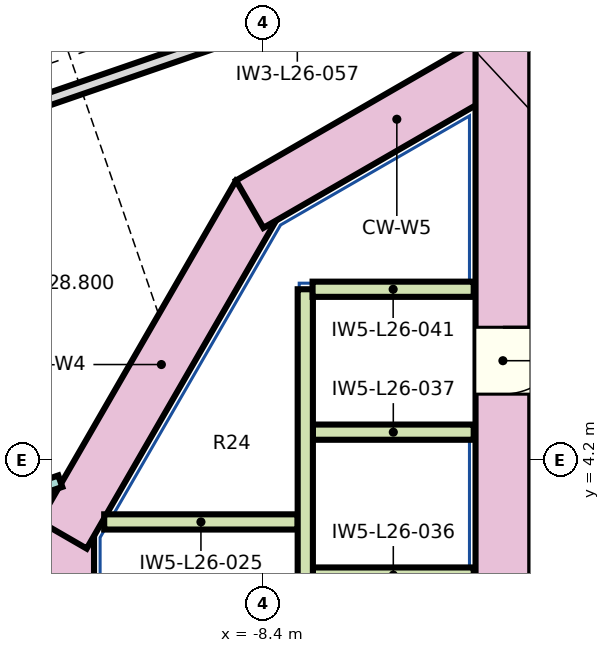
"""IFC4 building model, lengths in metres.
Left out: names, types, materials, properties, quantities, classifications, styles, units other than length and angle.
Written with IfcOpenShell. Run it as: python <this file> out.ifc"""

import sys

from ifc_helpers import new_model, si_unit, direction, frame, frame_2d, origin, place, context, subcontext, project, spatial, rectangle, extrude, element, fill, save


model = new_model("IFC4")
c1 = context("Model", 3, precision=1e-05, world=origin(), true_north=direction((0.0, 1.0)))
c2 = subcontext(c1, "Body", "Model", "MODEL_VIEW")
j1 = project(units=[si_unit("LENGTHUNIT", "METRE"), si_unit("PLANEANGLEUNIT", "RADIAN")], contexts=[c1])
p1 = place(None, origin())
s1 = spatial("IfcSite", under=j1, at=p1, CompositionType="ELEMENT")
p2 = place(p1, origin())
s2 = spatial("IfcBuilding", under=s1, at=p2, CompositionType="ELEMENT")
p3 = place(p2, frame((0.0, 0.0, 126.9)))
s3 = spatial("IfcBuildingStorey", under=s2, at=p3, CompositionType="ELEMENT", Elevation=126.9)
p4 = place(p3, frame((-11.624, -3.235, 0.0), z_axis=(0.0, 0.0, 1.0), x_axis=(0.0, 1.0, 0.0)))
e1 = element("IfcWall", 1, at=p4, inside=s3, PredefinedType="SHEAR", context=c2, shape_type="SweptSolid", body=[
    extrude(rectangle(XDim=6.471, YDim=0.9, at=frame_2d((3.235, 0.0))), origin(), (0.0, 0.0, 1.0), 3.8),
])
p5 = place(p3, frame((-11.684, 3.01, 0.0), z_axis=(0.0, 0.0, 1.0), x_axis=(0.499990282633, 0.866031014036, 0.0)))
e2 = element("IfcWall", 2, at=p5, inside=s3, PredefinedType="SHEAR", context=c2, shape_type="SweptSolid", body=[
    extrude(rectangle(XDim=6.47, YDim=0.9, at=frame_2d((3.235, 0.0))), origin(), (0.0, 0.0, 1.0), 3.8),
])
p6 = place(p3, frame((-8.614, 8.449, 0.0), z_axis=(0.0, 0.0, 1.0), x_axis=(0.866026961591, 0.49999730179, 0.0)))
e3 = element("IfcWall", 3, at=p6, inside=s3, PredefinedType="SHEAR", context=c2, shape_type="SweptSolid", body=[
    extrude(rectangle(XDim=5.587, YDim=0.9, at=frame_2d((2.794, 0.0))), origin(), (0.0, 0.0, 1.0), 3.8),
])
p7 = place(p3, frame((-4.45, 11.633, 0.0), z_axis=(0.0, 0.0, 1.0), x_axis=(0.0, -1.0, 0.0)))
e4 = element("IfcWall", 4, at=p7, inside=s3, PredefinedType="SHEAR", context=c2, shape_type="SweptSolid", body=[
    extrude(rectangle(XDim=23.265, YDim=0.9, at=frame_2d((11.633, 0.0))), origin(), (0.0, 0.0, 1.0), 3.8),
])
p8 = place(p7, frame((14.607, 0.0, 0.0)))
e5 = element("IfcOpeningElement", 5, at=p8, cuts=e4, PredefinedType="OPENING", context=c2, shape_type="SweptSolid", body=[
    extrude(rectangle(XDim=1.1, YDim=2.1, at=frame_2d((0.55, 1.05))), frame((0.0, 0.46, 0.0), z_axis=(0.0, -1.0, 0.0), x_axis=(1.0, 0.0, 0.0)), (0.0, 0.0, 1.0), 0.92),
])
p9 = place(p7, frame((16.958, 0.0, 0.0)))
e6 = element("IfcOpeningElement", 6, at=p9, cuts=e4, PredefinedType="OPENING", context=c2, shape_type="SweptSolid", body=[
    extrude(rectangle(XDim=1.1, YDim=2.1, at=frame_2d((0.55, 1.05))), frame((0.0, 0.46, 0.0), z_axis=(0.0, -1.0, 0.0), x_axis=(1.0, 0.0, 0.0)), (0.0, 0.0, 1.0), 0.92),
])
p10 = place(p7, frame((5.208, 0.0, 0.0)))
e7 = element("IfcOpeningElement", 7, at=p10, cuts=e4, PredefinedType="OPENING", context=c2, shape_type="SweptSolid", body=[
    extrude(rectangle(XDim=1.1, YDim=2.1, at=frame_2d((0.55, 1.05))), frame((0.0, 0.46, 0.0), z_axis=(0.0, -1.0, 0.0), x_axis=(1.0, 0.0, 0.0)), (0.0, 0.0, 1.0), 0.92),
])
p11 = place(p3, frame((-11.729, 3.894, 0.0), z_axis=(0.0, 0.0, 1.0), x_axis=(-0.945518607186, -0.325568062721, 0.0)))
e8 = element("IfcWall", 8, at=p11, inside=s3, PredefinedType="PARTITIONING", context=c2, shape_type="SweptSolid", body=[
    extrude(rectangle(XDim=3.116, YDim=0.2, at=frame_2d((1.558, 0.0))), origin(), (0.0, 0.0, 1.0), 3.55),
])
p12 = place(p3, frame((-11.007, 3.224, 0.0), z_axis=(0.0, 0.0, 1.0), x_axis=(1.0, 0.0, 0.0)))
e9 = element("IfcWall", 9, at=p12, inside=s3, PredefinedType="SOLIDWALL", context=c2, shape_type="SweptSolid", body=[
    extrude(rectangle(XDim=3.182, YDim=0.25, at=frame_2d((1.591, 0.0))), origin(), (0.0, 0.0, 1.0), 3.55),
])
for number, where, z_axis, x_axis in (
    (10, (-7.575, 2.35, 0.0), (0.0, 0.0, 1.0), (1.0, 0.0, 0.0)),
    (11, (-7.575, 4.7, 0.0), (0.0, 0.0, 1.0), (1.0, 0.0, 0.0)),
):
    element("IfcWall", number, at=place(p3, frame(where, z_axis=z_axis, x_axis=x_axis)), inside=s3, PredefinedType="SOLIDWALL", context=c2, shape_type="SweptSolid", body=[
        extrude(rectangle(XDim=2.645, YDim=0.25, at=frame_2d((1.323, 0.0))), origin(), (0.0, 0.0, 1.0), 3.55),
    ])
p13 = place(p3, frame((-7.7, 7.05, 0.0), z_axis=(0.0, 0.0, 1.0), x_axis=(0.0, -1.0, 0.0)))
e12 = element("IfcWall", 12, at=p13, inside=s3, PredefinedType="SOLIDWALL", context=c2, shape_type="SweptSolid", body=[
    extrude(rectangle(XDim=13.98, YDim=0.25, at=frame_2d((6.99, 0.0))), origin(), (0.0, 0.0, 1.0), 3.55),
])
p14 = place(p3, frame((-4.93, 7.05, 0.0), z_axis=(0.0, 0.0, 1.0), x_axis=(-1.0, 0.0, 0.0)))
e13 = element("IfcWall", 13, at=p14, inside=s3, PredefinedType="SOLIDWALL", context=c2, shape_type="SweptSolid", body=[
    extrude(rectangle(XDim=2.65, YDim=0.25, at=frame_2d((1.325, 0.0))), origin(), (0.0, 0.0, 1.0), 3.55),
])
p15 = place(p3, frame((4.599, 15.862, 0.0), z_axis=(0.0, 0.0, 1.0), x_axis=(-0.94551912499, -0.325566558907, 0.0)))
e14 = element("IfcWall", 14, at=p15, inside=s3, PredefinedType="PARTITIONING", context=c2, shape_type="SweptSolid", body=[
    extrude(rectangle(XDim=26.293, YDim=0.2, at=frame_2d((13.146, 0.0))), origin(), (0.0, 0.0, 1.0), 3.55),
])
p16 = place(p15, frame((10.81, 0.0, 0.0)))
e15 = element("IfcOpeningElement", 15, at=p16, cuts=e14, PredefinedType="OPENING", context=c2, shape_type="SweptSolid", body=[
    extrude(rectangle(XDim=0.9, YDim=2.1, at=frame_2d((0.45, 1.05))), frame((0.0, 0.11, 0.0), z_axis=(0.0, -1.0, 0.0), x_axis=(1.0, 0.0, 0.0)), (0.0, 0.0, 1.0), 0.22),
])
p17 = place(p15, frame((3.865, 0.0, 0.0)))
e16 = element("IfcOpeningElement", 16, at=p17, cuts=e14, PredefinedType="OPENING", context=c2, shape_type="SweptSolid", body=[
    extrude(rectangle(XDim=2.0, YDim=2.1, at=frame_2d((1.0, 1.05))), frame((0.0, 0.11, 0.0), z_axis=(0.0, -1.0, 0.0), x_axis=(1.0, 0.0, 0.0)), (0.0, 0.0, 1.0), 0.22),
])
p18 = place(p3, frame((12.7, 20.555, 0.0), z_axis=(0.0, 0.0, 1.0), x_axis=(-0.945517119144, -0.32557238428, 0.0)))
e17 = element("IfcWall", 17, at=p18, inside=s3, PredefinedType="PARTITIONING", context=c2, shape_type="SweptSolid", body=[
    extrude(rectangle(XDim=37.38, YDim=0.2, at=frame_2d((18.69, 0.0))), origin(), (0.0, 0.0, 1.0), 3.55),
])
p19 = place(p18, frame((7.0, 0.0, 0.0)))
e18 = element("IfcOpeningElement", 18, at=p19, cuts=e17, PredefinedType="OPENING", context=c2, shape_type="SweptSolid", body=[
    extrude(rectangle(XDim=1.2, YDim=2.1, at=frame_2d((0.6, 1.05))), frame((0.0, 0.11, 0.0), z_axis=(0.0, -1.0, 0.0), x_axis=(1.0, 0.0, 0.0)), (0.0, 0.0, 1.0), 0.22),
])
p20 = place(p18, frame((26.35, 0.0, 0.0)))
e19 = element("IfcOpeningElement", 19, at=p20, cuts=e17, PredefinedType="OPENING", context=c2, shape_type="SweptSolid", body=[
    extrude(rectangle(XDim=1.0, YDim=2.1, at=frame_2d((0.5, 1.05))), frame((0.0, 0.11, 0.0), z_axis=(0.0, -1.0, 0.0), x_axis=(1.0, 0.0, 0.0)), (0.0, 0.0, 1.0), 0.22),
])
p21 = place(p18, frame((0.35, 0.0, 0.0)))
e20 = element("IfcOpeningElement", 20, at=p21, cuts=e17, PredefinedType="OPENING", context=c2, shape_type="SweptSolid", body=[
    extrude(rectangle(XDim=1.0, YDim=2.1, at=frame_2d((0.5, 1.05))), frame((0.0, 0.11, 0.0), z_axis=(0.0, -1.0, 0.0), x_axis=(1.0, 0.0, 0.0)), (0.0, 0.0, 1.0), 0.22),
])
p22 = place(p18, frame((34.35, 0.0, 0.0)))
e21 = element("IfcOpeningElement", 21, at=p22, cuts=e17, PredefinedType="OPENING", context=c2, shape_type="SweptSolid", body=[
    extrude(rectangle(XDim=1.1, YDim=2.1, at=frame_2d((0.55, 1.05))), frame((0.0, 0.11, 0.0), z_axis=(0.0, -1.0, 0.0), x_axis=(1.0, 0.0, 0.0)), (0.0, 0.0, 1.0), 0.22),
])
p23 = place(p10, origin())
e22 = element("IfcDoor", 22, at=p23, inside=s3, OperationType="SLIDING_TO_LEFT", PredefinedType="DOOR", context=c2, shape_type="SweptSolid", body=[
    extrude(rectangle(XDim=1.1, YDim=2.1, at=frame_2d((0.55, 1.05))), frame((0.0, 0.025, 0.0), z_axis=(0.0, -1.0, 0.0), x_axis=(1.0, 0.0, 0.0)), (0.0, 0.0, 1.0), 0.05),
])
fill(e7, e22)
save(model, sys.argv[1])
